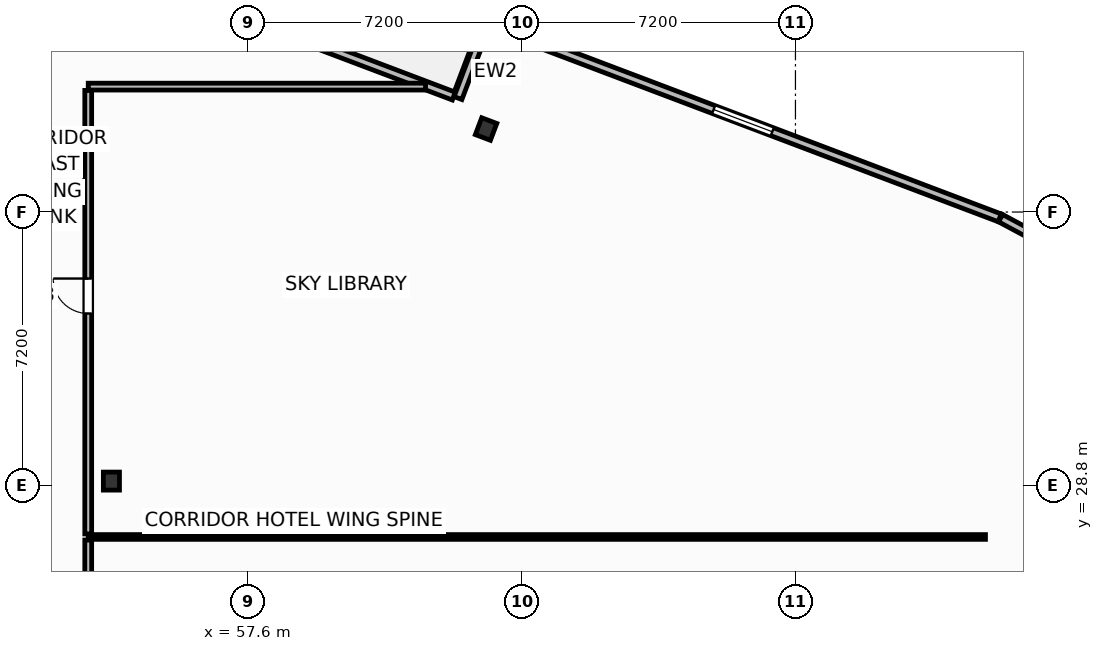
"""IFC4 building model, lengths in metres.
Left out: names, types, materials, properties, quantities, classifications, styles, units other than length and angle.
Written with IfcOpenShell. Run it as: python <this file> out.ifc"""

import sys

from ifc_helpers import new_model, si_unit, direction, frame, frame_2d, origin, origin_2d, place, context, subcontext, project, spatial, rectangle, i_section, extrude, element, fill, save


model = new_model("IFC4")
c1 = context("Model", 3, precision=1e-05, world=origin(), true_north=direction((0.0, 1.0)))
c2 = subcontext(c1, "Body", "Model", "MODEL_VIEW")
j1 = project(units=[si_unit("LENGTHUNIT", "METRE"), si_unit("PLANEANGLEUNIT", "RADIAN")], contexts=[c1])
p1 = place(None, origin())
s1 = spatial("IfcSite", under=j1, at=p1, CompositionType="ELEMENT")
p2 = place(p1, origin())
s2 = spatial("IfcBuilding", under=s1, at=p2, CompositionType="ELEMENT")
p3 = place(p2, frame((0.0, 0.0, 94.7)))
s3 = spatial("IfcBuildingStorey", under=s2, at=p3, CompositionType="ELEMENT", Elevation=94.7)
for number, where, z_axis, x_axis in (
    (1, (54.0, 28.92, 0.0), (0.0, 0.0, 1.0), (1.0, 0.0, 0.0)),
    (2, (63.859, 38.184, 0.0), (0.0, 0.0, 1.0), (0.935, -0.354, 0.0)),
):
    element("IfcColumn", number, at=place(p3, frame(where, z_axis=z_axis, x_axis=x_axis)), inside=s3, PredefinedType="COLUMN", context=c2, shape_type="SweptSolid", body=[
        extrude(i_section(OverallWidth=0.424, OverallDepth=0.474, WebThickness=0.048, FlangeThickness=0.077, FilletRadius=0.025, at=origin_2d()), origin(), (0.0, 0.0, 1.0), 3.7),
    ])
p4 = place(p3, frame((57.399, 41.175, 0.0), z_axis=(0.0, 0.0, 1.0), x_axis=(0.935227640088, -0.354046976001, 0.0)))
e3 = element("IfcWall", 3, at=p4, inside=s3, PredefinedType="SOLIDWALL", context=c2, shape_type="SweptSolid", body=[
    extrude(rectangle(XDim=6.0, YDim=0.22, at=frame_2d((3.0, 0.0))), origin(), (0.0, 0.0, 1.0), 2.73),
])
p5 = place(p4, frame((0.4, 0.0, 0.0)))
e4 = element("IfcOpeningElement", 4, at=p5, cuts=e3, PredefinedType="OPENING", context=c2, shape_type="SweptSolid", body=[
    extrude(rectangle(XDim=1.5, YDim=2.25, at=frame_2d((0.75, 1.125))), frame((0.0, 0.12, 0.0), z_axis=(0.0, -1.0, 0.0), x_axis=(1.0, 0.0, 0.0)), (0.0, 0.0, 1.0), 0.24),
])
p6 = place(p3, frame((78.597, 35.194, 0.0), z_axis=(0.0, 0.0, 1.0), x_axis=(-0.880948732004, 0.473211719614, 0.0)))
e5 = element("IfcWall", 5, at=p6, inside=s3, PredefinedType="SOLIDWALL", context=c2, shape_type="SweptSolid", body=[
    extrude(rectangle(XDim=1.361, YDim=0.22, at=frame_2d((0.681, 0.0))), origin(), (0.0, 0.0, 1.0), 2.73),
])
p7 = place(p3, frame((77.375, 35.847, 0.0), z_axis=(0.0, 0.0, 1.0), x_axis=(-0.935222448475, 0.354060689526, 0.0)))
e6 = element("IfcWall", 6, at=p7, inside=s3, PredefinedType="SOLIDWALL", context=c2, shape_type="SweptSolid", body=[
    extrude(rectangle(XDim=14.447, YDim=0.22, at=frame_2d((7.224, 0.0))), origin(), (0.0, 0.0, 1.0), 2.73),
])
p8 = place(p7, frame((6.399, 0.0, 0.8)))
e7 = element("IfcOpeningElement", 7, at=p8, cuts=e6, PredefinedType="OPENING", context=c2, shape_type="SweptSolid", body=[
    extrude(rectangle(XDim=1.65, YDim=1.65, at=frame_2d((0.825, 0.825))), frame((0.0, 0.12, 0.0), z_axis=(0.0, -1.0, 0.0), x_axis=(1.0, 0.0, 0.0)), (0.0, 0.0, 1.0), 0.24),
])
p9 = place(p3, frame((63.819, 40.845, 0.0), z_axis=(0.0, 0.0, 1.0), x_axis=(-0.354128791944, -0.935196663123, 0.0)))
e8 = element("IfcWall", 8, at=p9, inside=s3, PredefinedType="SOLIDWALL", context=c2, shape_type="SweptSolid", body=[
    extrude(rectangle(XDim=1.975, YDim=0.22, at=frame_2d((0.988, 0.0))), origin(), (0.0, 0.0, 1.0), 2.73),
])
p10 = place(p3, frame((53.39, 19.3, 0.0), z_axis=(0.0, 0.0, 1.0), x_axis=(0.0, 1.0, 0.0)))
e9 = element("IfcWall", 9, at=p10, inside=s3, PredefinedType="PARTITIONING", context=c2, shape_type="SweptSolid", body=[
    extrude(rectangle(XDim=8.07, YDim=0.18, at=frame_2d((4.035, 0.0))), origin(), (0.0, 0.0, 1.0), 3.45),
])
p11 = place(p10, frame((2.2, 0.0, 0.0)))
e10 = element("IfcOpeningElement", 10, at=p11, cuts=e9, PredefinedType="OPENING", context=c2, shape_type="SweptSolid", body=[
    extrude(rectangle(XDim=0.92, YDim=2.05, at=frame_2d((0.46, 1.025))), frame((0.0, 0.1, 0.0), z_axis=(0.0, -1.0, 0.0), x_axis=(1.0, 0.0, 0.0)), (0.0, 0.0, 1.0), 0.2),
])
p12 = place(p3, frame((53.39, 27.53, 0.0), z_axis=(0.0, 0.0, 1.0), x_axis=(0.0, 1.0, 0.0)))
e11 = element("IfcWall", 11, at=p12, inside=s3, PredefinedType="PARTITIONING", context=c2, shape_type="SweptSolid", body=[
    extrude(rectangle(XDim=11.67, YDim=0.18, at=frame_2d((5.835, 0.0))), origin(), (0.0, 0.0, 1.0), 3.45),
])
p13 = place(p12, frame((5.8, 0.0, 0.0)))
e12 = element("IfcOpeningElement", 12, at=p13, cuts=e11, PredefinedType="OPENING", context=c2, shape_type="SweptSolid", body=[
    extrude(rectangle(XDim=0.92, YDim=2.05, at=frame_2d((0.46, 1.025))), frame((0.0, 0.1, 0.0), z_axis=(0.0, -1.0, 0.0), x_axis=(1.0, 0.0, 0.0)), (0.0, 0.0, 1.0), 0.2),
])
p14 = place(p3, frame((53.39, 27.45, 0.0), z_axis=(0.0, 0.0, 1.0), x_axis=(1.0, 0.0, 0.0)))
e13 = element("IfcWall", 13, at=p14, inside=s3, PredefinedType="PARTITIONING", context=c2, shape_type="SweptSolid", body=[
    extrude(rectangle(XDim=23.61, YDim=0.125, at=frame_2d((11.805, 0.0))), origin(), (0.0, 0.0, 1.0), 3.45),
])
p15 = place(p3, frame((53.39, 39.3, 0.0), z_axis=(0.0, 0.0, 1.0), x_axis=(1.0, 0.0, 0.0)))
e14 = element("IfcWall", 14, at=p15, inside=s3, PredefinedType="PARTITIONING", context=c2, shape_type="SweptSolid", body=[
    extrude(rectangle(XDim=8.876, YDim=0.18, at=frame_2d((4.438, 0.0))), origin(), (0.0, 0.0, 1.0), 3.45),
])
p16 = place(p8, origin())
e15 = element("IfcWindow", 15, at=p16, inside=s3, PartitioningType="SINGLE_PANEL", PredefinedType="WINDOW", context=c2, shape_type="SweptSolid", body=[
    extrude(rectangle(XDim=1.65, YDim=1.65, at=frame_2d((0.825, 0.825))), frame((0.0, 0.03, 0.0), z_axis=(0.0, -1.0, 0.0), x_axis=(1.0, 0.0, 0.0)), (0.0, 0.0, 1.0), 0.06),
])
fill(e7, e15)
p17 = place(p13, origin())
e16 = element("IfcDoor", 16, at=p17, inside=s3, OperationType="SINGLE_SWING_RIGHT", PredefinedType="DOOR", context=c2, shape_type="SweptSolid", body=[
    extrude(rectangle(XDim=0.92, YDim=2.05, at=frame_2d((0.46, 1.025))), frame((0.0, 0.025, 0.0), z_axis=(0.0, -1.0, 0.0), x_axis=(1.0, 0.0, 0.0)), (0.0, 0.0, 1.0), 0.05),
])
fill(e12, e16)
save(model, sys.argv[1])
